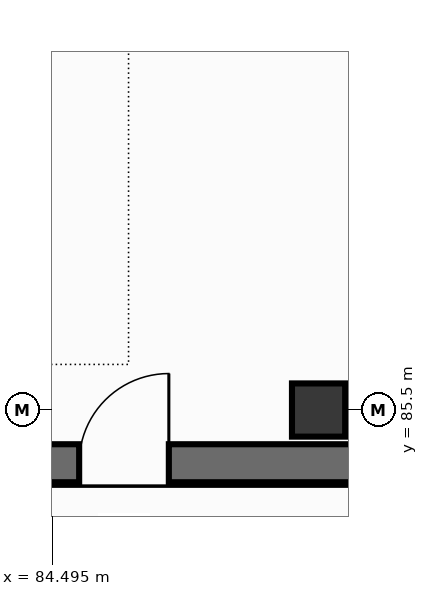
"""IFC4 building model, lengths in metres.
Left out: names, types, materials, properties, quantities, classifications, styles, units other than length and angle.
Written with IfcOpenShell. Run it as: python <this file> out.ifc"""

import sys

from ifc_helpers import new_model, si_unit, direction, frame, frame_2d, origin, origin_2d, place, context, subcontext, project, spatial, rectangle, extrude, element, fill, save


model = new_model("IFC4")
c1 = context("Model", 3, precision=1e-05, world=origin(), true_north=direction((0.0, 1.0)))
c2 = subcontext(c1, "Body", "Model", "MODEL_VIEW")
j1 = project(units=[si_unit("LENGTHUNIT", "METRE"), si_unit("PLANEANGLEUNIT", "RADIAN")], contexts=[c1])
p1 = place(None, origin())
s1 = spatial("IfcSite", under=j1, at=p1, CompositionType="ELEMENT")
p2 = place(p1, origin())
s2 = spatial("IfcBuilding", under=s1, at=p2, CompositionType="ELEMENT")
p3 = place(p2, frame((0.0, 0.0, -4.2)))
s3 = spatial("IfcBuildingStorey", under=s2, at=p3, CompositionType="ELEMENT", Elevation=-4.2)
p4 = place(p3, frame((29.05, 84.8, 0.0), z_axis=(0.0, 0.0, 1.0), x_axis=(1.0, 0.0, 0.0)))
e1 = element("IfcWall", 1, at=p4, inside=s3, PredefinedType="USERDEFINED", context=c2, shape_type="SweptSolid", body=[
    extrude(rectangle(XDim=87.95, YDim=0.5, at=frame_2d((43.975, 0.0))), origin(), (0.0, 0.0, 1.0), 3.94),
])
p5 = place(p4, frame((55.8, 0.0, 0.0)))
e2 = element("IfcOpeningElement", 2, at=p5, cuts=e1, PredefinedType="OPENING", context=c2, shape_type="SweptSolid", body=[
    extrude(rectangle(XDim=1.18, YDim=2.24, at=frame_2d((0.59, 1.12))), frame((0.0, 0.26, 0.0), z_axis=(0.0, -1.0, 0.0), x_axis=(1.0, 0.0, 0.0)), (0.0, 0.0, 1.0), 0.52),
])
p6 = place(p3, frame((88.0, 85.5, 0.0), z_axis=(0.0, 0.0, 1.0), x_axis=(1.0, 0.0, 0.0)))
e3 = element("IfcColumn", 3, at=p6, inside=s3, PredefinedType="COLUMN", context=c2, shape_type="SweptSolid", body=[
    extrude(rectangle(XDim=0.7, YDim=0.7, at=origin_2d()), origin(), (0.0, 0.0, 1.0), 4.2),
])
p7 = place(p5, origin())
e4 = element("IfcDoor", 4, at=p7, inside=s3, OperationType="SINGLE_SWING_RIGHT", PredefinedType="DOOR", context=c2, shape_type="SweptSolid", body=[
    extrude(rectangle(XDim=1.18, YDim=2.24, at=frame_2d((0.59, 1.12))), frame((0.0, 0.025, 0.0), z_axis=(0.0, -1.0, 0.0), x_axis=(1.0, 0.0, 0.0)), (0.0, 0.0, 1.0), 0.05),
])
fill(e2, e4)
save(model, sys.argv[1])
